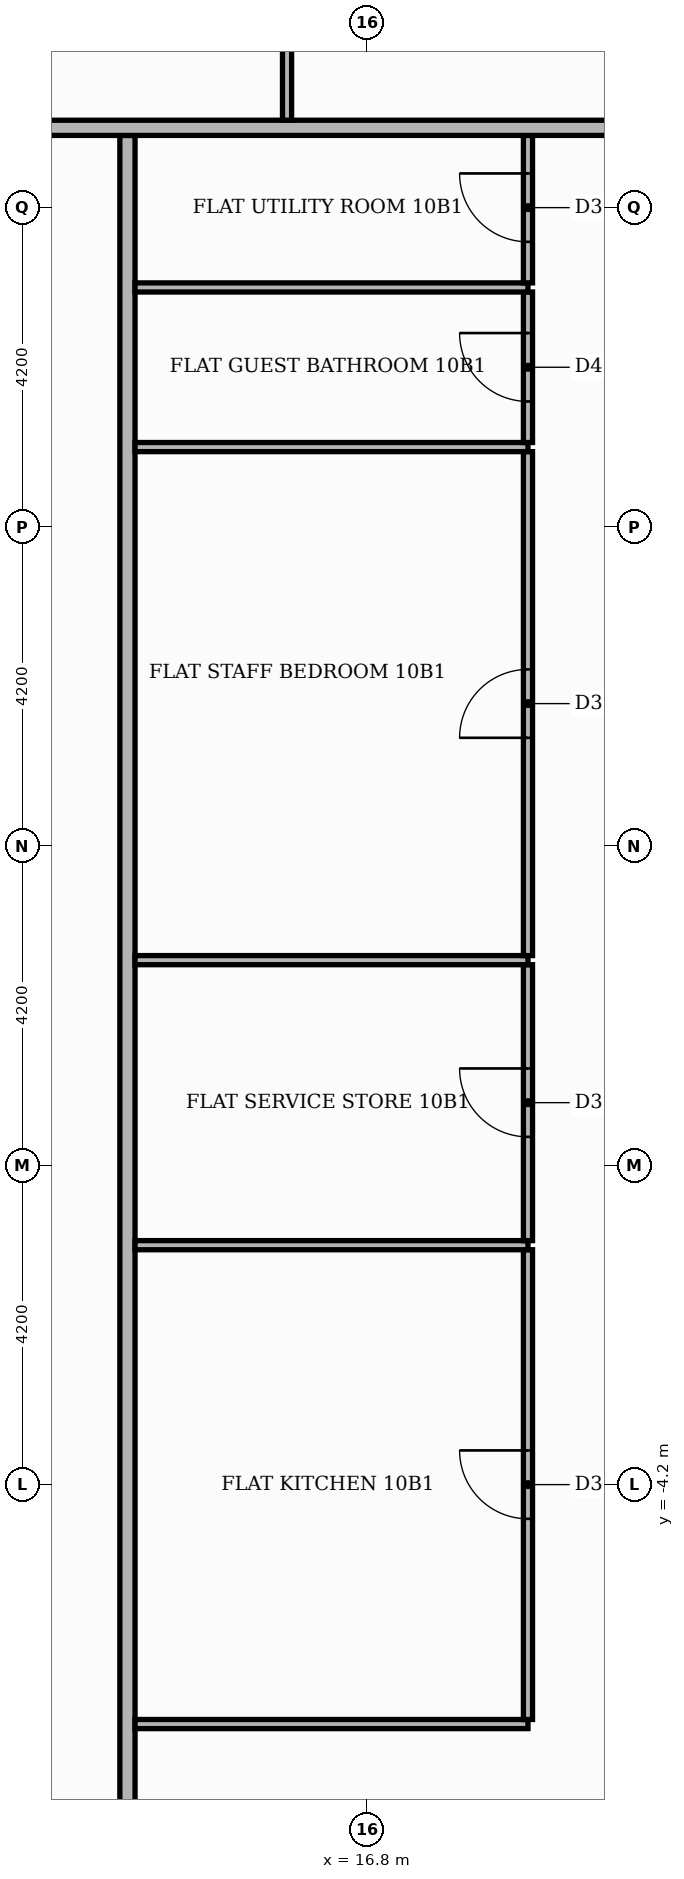
"""IFC4 building model, lengths in metres.
Left out: names, types, materials, properties, quantities, classifications, styles, units other than length and angle.
Written with IfcOpenShell. Run it as: python <this file> out.ifc"""

import sys

from ifc_helpers import new_model, si_unit, direction, frame, frame_2d, origin, place, context, subcontext, project, spatial, rectangle, extrude, element, fill, save


model = new_model("IFC4")
c1 = context("Model", 3, precision=1e-05, world=origin(), true_north=direction((0.0, 1.0)))
c2 = subcontext(c1, "Body", "Model", "MODEL_VIEW")
j1 = project(units=[si_unit("LENGTHUNIT", "METRE"), si_unit("PLANEANGLEUNIT", "RADIAN")], contexts=[c1])
p1 = place(None, origin())
s1 = spatial("IfcSite", under=j1, at=p1, CompositionType="ELEMENT")
p2 = place(p1, origin())
s2 = spatial("IfcBuilding", under=s1, at=p2, CompositionType="ELEMENT")
p3 = place(p2, frame((0.0, 0.0, 46.5)))
s3 = spatial("IfcBuildingStorey", under=s2, at=p3, CompositionType="ELEMENT", Elevation=46.5)
p4 = place(p3, frame((13.65, -13.55, 0.0), z_axis=(0.0, 0.0, 1.0), x_axis=(0.0, 1.0, 0.0)))
e1 = element("IfcWall", 1, at=p4, inside=s3, PredefinedType="PARTITIONING", context=c2, shape_type="SweptSolid", body=[
    extrude(rectangle(XDim=27.1, YDim=0.2, at=frame_2d((13.55, 0.0))), origin(), (0.0, 0.0, 1.0), 3.48),
])
p5 = place(p4, frame((2.5, 0.0, 0.0)))
e2 = element("IfcOpeningElement", 2, at=p5, cuts=e1, PredefinedType="OPENING", context=c2, shape_type="SweptSolid", body=[
    extrude(rectangle(XDim=1.1, YDim=2.4, at=frame_2d((0.55, 1.2))), frame((0.0, 0.11, 0.0), z_axis=(0.0, -1.0, 0.0), x_axis=(1.0, 0.0, 0.0)), (0.0, 0.0, 1.0), 0.22),
])
p6 = place(p3, frame((13.75, -7.35, 0.0), z_axis=(0.0, 0.0, 1.0), x_axis=(1.0, 0.0, 0.0)))
e3 = element("IfcWall", 3, at=p6, inside=s3, PredefinedType="PARTITIONING", context=c2, shape_type="SweptSolid", body=[
    extrude(rectangle(XDim=5.17, YDim=0.12, at=frame_2d((2.585, 0.0))), origin(), (0.0, 0.0, 1.0), 3.48),
])
p7 = place(p3, frame((18.92, -7.29, 0.0), z_axis=(0.0, 0.0, 1.0), x_axis=(0.0, 1.0, 0.0)))
e4 = element("IfcWall", 4, at=p7, inside=s3, PredefinedType="PARTITIONING", context=c2, shape_type="SweptSolid", body=[
    extrude(rectangle(XDim=6.18, YDim=0.12, at=frame_2d((3.09, 0.0))), origin(), (0.0, 0.0, 1.0), 3.48),
])
p8 = place(p7, frame((2.64, 0.0, 0.0)))
e5 = element("IfcOpeningElement", 5, at=p8, cuts=e4, PredefinedType="OPENING", context=c2, shape_type="SweptSolid", body=[
    extrude(rectangle(XDim=0.9, YDim=2.1, at=frame_2d((0.45, 1.05))), frame((0.0, 0.07, 0.0), z_axis=(0.0, -1.0, 0.0), x_axis=(1.0, 0.0, 0.0)), (0.0, 0.0, 1.0), 0.14),
])
p9 = place(p3, frame((13.75, -1.05, 0.0), z_axis=(0.0, 0.0, 1.0), x_axis=(1.0, 0.0, 0.0)))
e6 = element("IfcWall", 6, at=p9, inside=s3, PredefinedType="PARTITIONING", context=c2, shape_type="SweptSolid", body=[
    extrude(rectangle(XDim=5.17, YDim=0.12, at=frame_2d((2.585, 0.0))), origin(), (0.0, 0.0, 1.0), 3.48),
])
p10 = place(p3, frame((18.92, -0.99, 0.0), z_axis=(0.0, 0.0, 1.0), x_axis=(0.0, 1.0, 0.0)))
e7 = element("IfcWall", 7, at=p10, inside=s3, PredefinedType="PARTITIONING", context=c2, shape_type="SweptSolid", body=[
    extrude(rectangle(XDim=3.63, YDim=0.12, at=frame_2d((1.815, 0.0))), origin(), (0.0, 0.0, 1.0), 3.48),
])
p11 = place(p10, frame((1.365, 0.0, 0.0)))
e8 = element("IfcOpeningElement", 8, at=p11, cuts=e7, PredefinedType="OPENING", context=c2, shape_type="SweptSolid", body=[
    extrude(rectangle(XDim=0.9, YDim=2.1, at=frame_2d((0.45, 1.05))), frame((0.0, 0.07, 0.0), z_axis=(0.0, -1.0, 0.0), x_axis=(1.0, 0.0, 0.0)), (0.0, 0.0, 1.0), 0.14),
])
p12 = place(p3, frame((13.75, 2.7, 0.0), z_axis=(0.0, 0.0, 1.0), x_axis=(1.0, 0.0, 0.0)))
e9 = element("IfcWall", 9, at=p12, inside=s3, PredefinedType="PARTITIONING", context=c2, shape_type="SweptSolid", body=[
    extrude(rectangle(XDim=5.17, YDim=0.12, at=frame_2d((2.585, 0.0))), origin(), (0.0, 0.0, 1.0), 3.48),
])
p13 = place(p3, frame((18.92, 2.76, 0.0), z_axis=(0.0, 0.0, 1.0), x_axis=(0.0, 1.0, 0.0)))
e10 = element("IfcWall", 10, at=p13, inside=s3, PredefinedType="PARTITIONING", context=c2, shape_type="SweptSolid", body=[
    extrude(rectangle(XDim=6.63, YDim=0.12, at=frame_2d((3.315, 0.0))), origin(), (0.0, 0.0, 1.0), 3.48),
])
p14 = place(p13, frame((2.865, 0.0, 0.0)))
e11 = element("IfcOpeningElement", 11, at=p14, cuts=e10, PredefinedType="OPENING", context=c2, shape_type="SweptSolid", body=[
    extrude(rectangle(XDim=0.9, YDim=2.1, at=frame_2d((0.45, 1.05))), frame((0.0, 0.07, 0.0), z_axis=(0.0, -1.0, 0.0), x_axis=(1.0, 0.0, 0.0)), (0.0, 0.0, 1.0), 0.14),
])
p15 = place(p3, frame((13.75, 9.45, 0.0), z_axis=(0.0, 0.0, 1.0), x_axis=(1.0, 0.0, 0.0)))
e12 = element("IfcWall", 12, at=p15, inside=s3, PredefinedType="PARTITIONING", context=c2, shape_type="SweptSolid", body=[
    extrude(rectangle(XDim=5.17, YDim=0.12, at=frame_2d((2.585, 0.0))), origin(), (0.0, 0.0, 1.0), 3.48),
])
p16 = place(p3, frame((18.92, 9.51, 0.0), z_axis=(0.0, 0.0, 1.0), x_axis=(0.0, 1.0, 0.0)))
e13 = element("IfcWall", 13, at=p16, inside=s3, PredefinedType="PARTITIONING", context=c2, shape_type="SweptSolid", body=[
    extrude(rectangle(XDim=1.98, YDim=0.12, at=frame_2d((0.99, 0.0))), origin(), (0.0, 0.0, 1.0), 3.48),
])
p17 = place(p16, frame((0.54, 0.0, 0.0)))
e14 = element("IfcOpeningElement", 14, at=p17, cuts=e13, PredefinedType="OPENING", context=c2, shape_type="SweptSolid", body=[
    extrude(rectangle(XDim=0.9, YDim=2.1, at=frame_2d((0.45, 1.05))), frame((0.0, 0.07, 0.0), z_axis=(0.0, -1.0, 0.0), x_axis=(1.0, 0.0, 0.0)), (0.0, 0.0, 1.0), 0.14),
])
p18 = place(p3, frame((13.75, 11.55, 0.0), z_axis=(0.0, 0.0, 1.0), x_axis=(1.0, 0.0, 0.0)))
e15 = element("IfcWall", 15, at=p18, inside=s3, PredefinedType="PARTITIONING", context=c2, shape_type="SweptSolid", body=[
    extrude(rectangle(XDim=5.17, YDim=0.12, at=frame_2d((2.585, 0.0))), origin(), (0.0, 0.0, 1.0), 3.48),
])
p19 = place(p3, frame((18.92, 11.61, 0.0), z_axis=(0.0, 0.0, 1.0), x_axis=(0.0, 1.0, 0.0)))
e16 = element("IfcWall", 16, at=p19, inside=s3, PredefinedType="PARTITIONING", context=c2, shape_type="SweptSolid", body=[
    extrude(rectangle(XDim=1.94, YDim=0.12, at=frame_2d((0.97, 0.0))), origin(), (0.0, 0.0, 1.0), 3.48),
])
p20 = place(p19, frame((0.54, 0.0, 0.0)))
e17 = element("IfcOpeningElement", 17, at=p20, cuts=e16, PredefinedType="OPENING", context=c2, shape_type="SweptSolid", body=[
    extrude(rectangle(XDim=0.9, YDim=2.1, at=frame_2d((0.45, 1.05))), frame((0.0, 0.07, 0.0), z_axis=(0.0, -1.0, 0.0), x_axis=(1.0, 0.0, 0.0)), (0.0, 0.0, 1.0), 0.14),
])
p21 = place(p3, frame((-13.65, 13.65, 0.0), z_axis=(0.0, 0.0, 1.0), x_axis=(1.0, 0.0, 0.0)))
e18 = element("IfcWall", 18, at=p21, inside=s3, PredefinedType="PARTITIONING", context=c2, shape_type="SweptSolid", body=[
    extrude(rectangle(XDim=39.07, YDim=0.2, at=frame_2d((19.535, 0.0))), origin(), (0.0, 0.0, 1.0), 3.48),
])
p22 = place(p21, frame((24.65, 0.0, 0.0)))
e19 = element("IfcOpeningElement", 19, at=p22, cuts=e18, PredefinedType="OPENING", context=c2, shape_type="SweptSolid", body=[
    extrude(rectangle(XDim=1.1, YDim=2.4, at=frame_2d((0.55, 1.2))), frame((0.0, 0.11, 0.0), z_axis=(0.0, -1.0, 0.0), x_axis=(1.0, 0.0, 0.0)), (0.0, 0.0, 1.0), 0.22),
])
p23 = place(p21, frame((14.15, 0.0, 0.0)))
e20 = element("IfcOpeningElement", 20, at=p23, cuts=e18, PredefinedType="OPENING", context=c2, shape_type="SweptSolid", body=[
    extrude(rectangle(XDim=1.1, YDim=2.4, at=frame_2d((0.55, 1.2))), frame((0.0, 0.11, 0.0), z_axis=(0.0, -1.0, 0.0), x_axis=(1.0, 0.0, 0.0)), (0.0, 0.0, 1.0), 0.22),
])
p24 = place(p3, frame((15.75, 13.75, 0.0), z_axis=(0.0, 0.0, 1.0), x_axis=(0.0, 1.0, 0.0)))
e21 = element("IfcWall", 21, at=p24, inside=s3, PredefinedType="PARTITIONING", context=c2, shape_type="SweptSolid", body=[
    extrude(rectangle(XDim=6.31, YDim=0.12, at=frame_2d((3.155, 0.0))), origin(), (0.0, 0.0, 1.0), 3.48),
])
p25 = place(p24, frame((2.635, 0.0, 0.0)))
e22 = element("IfcOpeningElement", 22, at=p25, cuts=e21, PredefinedType="OPENING", context=c2, shape_type="SweptSolid", body=[
    extrude(rectangle(XDim=1.0, YDim=2.1, at=frame_2d((0.5, 1.05))), frame((0.0, 0.07, 0.0), z_axis=(0.0, -1.0, 0.0), x_axis=(1.0, 0.0, 0.0)), (0.0, 0.0, 1.0), 0.14),
])
p26 = place(p8, origin())
e23 = element("IfcDoor", 23, at=p26, inside=s3, OperationType="SINGLE_SWING_RIGHT", PredefinedType="DOOR", context=c2, shape_type="SweptSolid", body=[
    extrude(rectangle(XDim=0.9, YDim=2.1, at=frame_2d((0.45, 1.05))), frame((0.0, 0.025, 0.0), z_axis=(0.0, -1.0, 0.0), x_axis=(1.0, 0.0, 0.0)), (0.0, 0.0, 1.0), 0.05),
])
fill(e5, e23)
p27 = place(p11, origin())
e24 = element("IfcDoor", 24, at=p27, inside=s3, OperationType="SINGLE_SWING_RIGHT", PredefinedType="DOOR", context=c2, shape_type="SweptSolid", body=[
    extrude(rectangle(XDim=0.9, YDim=2.1, at=frame_2d((0.45, 1.05))), frame((0.0, 0.025, 0.0), z_axis=(0.0, -1.0, 0.0), x_axis=(1.0, 0.0, 0.0)), (0.0, 0.0, 1.0), 0.05),
])
fill(e8, e24)
p28 = place(p14, origin())
e25 = element("IfcDoor", 25, at=p28, inside=s3, OperationType="SINGLE_SWING_LEFT", PredefinedType="DOOR", context=c2, shape_type="SweptSolid", body=[
    extrude(rectangle(XDim=0.9, YDim=2.1, at=frame_2d((0.45, 1.05))), frame((0.0, 0.025, 0.0), z_axis=(0.0, -1.0, 0.0), x_axis=(1.0, 0.0, 0.0)), (0.0, 0.0, 1.0), 0.05),
])
fill(e11, e25)
p29 = place(p17, origin())
e26 = element("IfcDoor", 26, at=p29, inside=s3, OperationType="SINGLE_SWING_RIGHT", PredefinedType="DOOR", context=c2, shape_type="SweptSolid", body=[
    extrude(rectangle(XDim=0.9, YDim=2.1, at=frame_2d((0.45, 1.05))), frame((0.0, 0.025, 0.0), z_axis=(0.0, -1.0, 0.0), x_axis=(1.0, 0.0, 0.0)), (0.0, 0.0, 1.0), 0.05),
])
fill(e14, e26)
p30 = place(p20, origin())
e27 = element("IfcDoor", 27, at=p30, inside=s3, OperationType="SINGLE_SWING_RIGHT", PredefinedType="DOOR", context=c2, shape_type="SweptSolid", body=[
    extrude(rectangle(XDim=0.9, YDim=2.1, at=frame_2d((0.45, 1.05))), frame((0.0, 0.025, 0.0), z_axis=(0.0, -1.0, 0.0), x_axis=(1.0, 0.0, 0.0)), (0.0, 0.0, 1.0), 0.05),
])
fill(e17, e27)
save(model, sys.argv[1])
